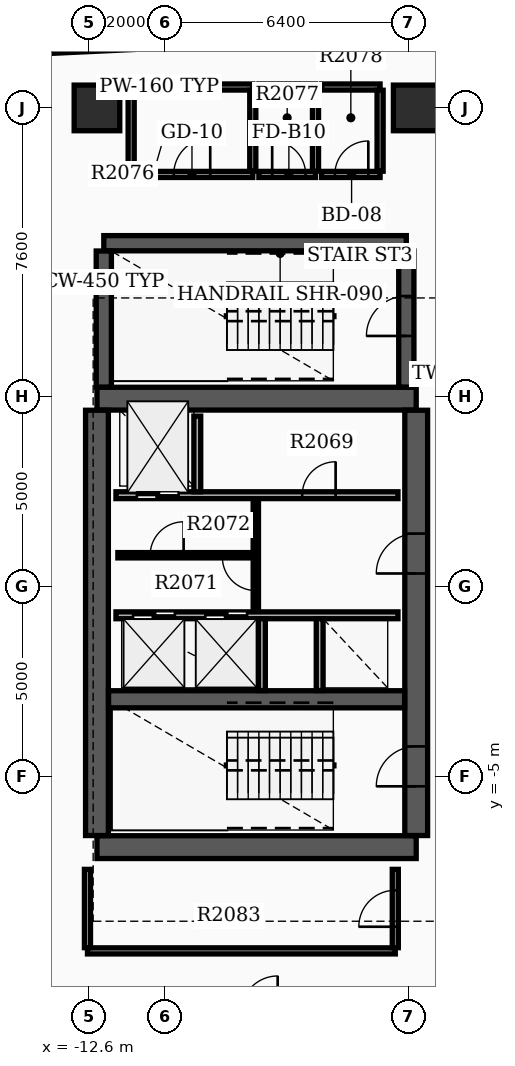
"""IFC4 building model, lengths in metres.
Left out: names, types, materials, properties, quantities, classifications, styles, units other than length and angle.
Written with IfcOpenShell. Run it as: python <this file> out.ifc"""

import sys

from ifc_helpers import new_model, si_unit, direction, frame, frame_2d, origin, origin_2d, place, context, subcontext, project, spatial, rectangle, extrude, element, fill, save


model = new_model("IFC4")
c1 = context("Model", 3, precision=1e-05, world=origin(), true_north=direction((0.0, 1.0)))
c2 = subcontext(c1, "Body", "Model", "MODEL_VIEW")
j1 = project(units=[si_unit("LENGTHUNIT", "METRE"), si_unit("PLANEANGLEUNIT", "RADIAN")], contexts=[c1])
p1 = place(None, origin())
s1 = spatial("IfcSite", under=j1, at=p1, CompositionType="ELEMENT")
p2 = place(p1, origin())
s2 = spatial("IfcBuilding", under=s1, at=p2, CompositionType="ELEMENT")
p3 = place(p2, frame((0.0, 0.0, 132.0)))
s3 = spatial("IfcBuildingStorey", under=s2, at=p3, CompositionType="ELEMENT", Elevation=132.0)
for number, where, z_axis, x_axis in (
    (1, (-12.4, -6.85, 0.0), (0.0, 0.0, 1.0), (1.0, 0.0, 0.0)),
    (2, (-12.4, 4.95, 0.0), (0.0, 0.0, 1.0), (1.0, 0.0, 0.0)),
):
    element("IfcWall", number, at=place(p3, frame(where, z_axis=z_axis, x_axis=x_axis)), inside=s3, PredefinedType="SHEAR", context=c2, shape_type="SweptSolid", body=[
        extrude(rectangle(XDim=8.4, YDim=0.6, at=frame_2d((4.2, 0.0))), origin(), (0.0, 0.0, 1.0), 3.7),
    ])
p4 = place(p3, frame((-12.4, -6.545, 0.0), z_axis=(0.0, 0.0, 1.0), x_axis=(0.0, 1.0, 0.0)))
e3 = element("IfcWall", 3, at=p4, inside=s3, PredefinedType="SHEAR", context=c2, shape_type="SweptSolid", body=[
    extrude(rectangle(XDim=11.19, YDim=0.6, at=frame_2d((5.595, 0.0))), origin(), (0.0, 0.0, 1.0), 3.7),
])
p5 = place(p3, frame((-4.0, -6.545, 0.0), z_axis=(0.0, 0.0, 1.0), x_axis=(0.0, 1.0, 0.0)))
e4 = element("IfcWall", 4, at=p5, inside=s3, PredefinedType="SHEAR", context=c2, shape_type="SweptSolid", body=[
    extrude(rectangle(XDim=11.19, YDim=0.6, at=frame_2d((5.595, 0.0))), origin(), (0.0, 0.0, 1.0), 3.7),
])
p6 = place(p5, frame((1.295, 0.0, 0.0)))
e5 = element("IfcOpeningElement", 5, at=p6, cuts=e4, PredefinedType="OPENING", context=c2, shape_type="SweptSolid", body=[
    extrude(rectangle(XDim=1.05, YDim=2.15, at=frame_2d((0.525, 1.075))), frame((0.0, 0.31, 0.0), z_axis=(0.0, -1.0, 0.0), x_axis=(1.0, 0.0, 0.0)), (0.0, 0.0, 1.0), 0.62),
])
p7 = place(p5, frame((6.895, 0.0, 0.0)))
e6 = element("IfcOpeningElement", 6, at=p7, cuts=e4, PredefinedType="OPENING", context=c2, shape_type="SweptSolid", body=[
    extrude(rectangle(XDim=1.05, YDim=2.15, at=frame_2d((0.525, 1.075))), frame((0.0, 0.31, 0.0), z_axis=(0.0, -1.0, 0.0), x_axis=(1.0, 0.0, 0.0)), (0.0, 0.0, 1.0), 0.62),
])
p8 = place(p3, frame((-12.095, -2.96, 0.0), z_axis=(0.0, 0.0, 1.0), x_axis=(1.0, 0.0, 0.0)))
e7 = element("IfcWall", 7, at=p8, inside=s3, PredefinedType="SHEAR", context=c2, shape_type="SweptSolid", body=[
    extrude(rectangle(XDim=7.79, YDim=0.45, at=frame_2d((3.895, 0.0))), origin(), (0.0, 0.0, 1.0), 3.7),
])
p9 = place(p3, frame((-12.22, 9.04, 0.0), z_axis=(0.0, 0.0, 1.0), x_axis=(1.0, 0.0, 0.0)))
e8 = element("IfcWall", 8, at=p9, inside=s3, PredefinedType="SHEAR", context=c2, shape_type="SweptSolid", body=[
    extrude(rectangle(XDim=7.96, YDim=0.4, at=frame_2d((3.98, 0.0))), origin(), (0.0, 0.0, 1.0), 3.7),
])
p10 = place(p3, frame((-12.22, 5.255, 0.0), z_axis=(0.0, 0.0, 1.0), x_axis=(0.0, 1.0, 0.0)))
e9 = element("IfcWall", 9, at=p10, inside=s3, PredefinedType="SHEAR", context=c2, shape_type="SweptSolid", body=[
    extrude(rectangle(XDim=3.58, YDim=0.4, at=frame_2d((1.79, 0.0))), origin(), (0.0, 0.0, 1.0), 3.7),
])
p11 = place(p3, frame((-4.26, 5.255, 0.0), z_axis=(0.0, 0.0, 1.0), x_axis=(0.0, 1.0, 0.0)))
e10 = element("IfcWall", 10, at=p11, inside=s3, PredefinedType="SHEAR", context=c2, shape_type="SweptSolid", body=[
    extrude(rectangle(XDim=3.58, YDim=0.4, at=frame_2d((1.79, 0.0))), origin(), (0.0, 0.0, 1.0), 3.7),
])
p12 = place(p11, frame((1.345, 0.0, 0.0)))
e11 = element("IfcOpeningElement", 11, at=p12, cuts=e10, PredefinedType="OPENING", context=c2, shape_type="SweptSolid", body=[
    extrude(rectangle(XDim=1.05, YDim=2.15, at=frame_2d((0.525, 1.075))), frame((0.0, 0.21, 0.0), z_axis=(0.0, -1.0, 0.0), x_axis=(1.0, 0.0, 0.0)), (0.0, 0.0, 1.0), 0.42),
])
for number, where, z_axis, x_axis in (
    (12, (-12.4, 12.6, 0.0), (0.0, 0.0, 1.0), (1.0, 0.0, 0.0)),
    (13, (-4.0, 12.6, 0.0), (0.0, 0.0, 1.0), (1.0, 0.0, 0.0)),
):
    element("IfcColumn", number, at=place(p3, frame(where, z_axis=z_axis, x_axis=x_axis)), inside=s3, PredefinedType="COLUMN", context=c2, shape_type="SweptSolid", body=[
        extrude(rectangle(XDim=1.2, YDim=1.2, at=origin_2d()), origin(), (0.0, 0.0, 1.0), 3.9),
    ])
p13 = place(p3, frame((-13.843, 14.164, 0.0), z_axis=(0.0, 0.0, 1.0), x_axis=(0.998889082162, 0.047123258997, 0.0)))
e14 = element("IfcWall", 14, at=p13, inside=s3, PredefinedType="STANDARD", context=c2, shape_type="SweptSolid", body=[
    extrude(rectangle(XDim=6.3, YDim=0.28, at=frame_2d((3.15, 0.0))), origin(), (0.0, 0.0, 1.0), 2.97),
])
p14 = place(p3, frame((-11.9, 2.41, 0.0), z_axis=(0.0, 0.0, 1.0), x_axis=(1.0, 0.0, 0.0)))
e15 = element("IfcWall", 15, at=p14, inside=s3, PredefinedType="SOLIDWALL", context=c2, shape_type="SweptSolid", body=[
    extrude(rectangle(XDim=7.42, YDim=0.18, at=frame_2d((3.71, 0.0))), origin(), (0.0, 0.0, 1.0), 2.96),
])
p15 = place(p14, frame((0.55, 0.0, 0.0)))
e16 = element("IfcOpeningElement", 16, at=p15, cuts=e15, PredefinedType="OPENING", context=c2, shape_type="SweptSolid", body=[
    extrude(rectangle(XDim=1.1, YDim=2.15, at=frame_2d((0.55, 1.075))), frame((0.0, 0.1, 0.0), z_axis=(0.0, -1.0, 0.0), x_axis=(1.0, 0.0, 0.0)), (0.0, 0.0, 1.0), 0.2),
])
p16 = place(p14, frame((4.9, 0.0, 0.0)))
e17 = element("IfcOpeningElement", 17, at=p16, cuts=e15, PredefinedType="OPENING", context=c2, shape_type="SweptSolid", body=[
    extrude(rectangle(XDim=0.88, YDim=2.1, at=frame_2d((0.44, 1.05))), frame((0.0, 0.1, 0.0), z_axis=(0.0, -1.0, 0.0), x_axis=(1.0, 0.0, 0.0)), (0.0, 0.0, 1.0), 0.2),
])
p17 = place(p3, frame((-11.9, -0.75, 0.0), z_axis=(0.0, 0.0, 1.0), x_axis=(1.0, 0.0, 0.0)))
e18 = element("IfcWall", 18, at=p17, inside=s3, PredefinedType="SOLIDWALL", context=c2, shape_type="SweptSolid", body=[
    extrude(rectangle(XDim=7.42, YDim=0.18, at=frame_2d((3.71, 0.0))), origin(), (0.0, 0.0, 1.0), 2.96),
])
p18 = place(p17, frame((0.45, 0.0, 0.0)))
e19 = element("IfcOpeningElement", 19, at=p18, cuts=e18, PredefinedType="OPENING", context=c2, shape_type="SweptSolid", body=[
    extrude(rectangle(XDim=1.1, YDim=2.15, at=frame_2d((0.55, 1.075))), frame((0.0, 0.1, 0.0), z_axis=(0.0, -1.0, 0.0), x_axis=(1.0, 0.0, 0.0)), (0.0, 0.0, 1.0), 0.2),
])
p19 = place(p17, frame((2.35, 0.0, 0.0)))
e20 = element("IfcOpeningElement", 20, at=p19, cuts=e18, PredefinedType="OPENING", context=c2, shape_type="SweptSolid", body=[
    extrude(rectangle(XDim=1.1, YDim=2.15, at=frame_2d((0.55, 1.075))), frame((0.0, 0.1, 0.0), z_axis=(0.0, -1.0, 0.0), x_axis=(1.0, 0.0, 0.0)), (0.0, 0.0, 1.0), 0.2),
])
p20 = place(p3, frame((-9.76, 2.5, 0.0), z_axis=(0.0, 0.0, 1.0), x_axis=(0.0, 1.0, 0.0)))
e21 = element("IfcWall", 21, at=p20, inside=s3, PredefinedType="SOLIDWALL", context=c2, shape_type="SweptSolid", body=[
    extrude(rectangle(XDim=1.99, YDim=0.18, at=frame_2d((0.995, 0.0))), origin(), (0.0, 0.0, 1.0), 2.96),
])
for number, where, z_axis, x_axis in (
    (22, (-8.06, -2.73, 0.0), (0.0, 0.0, 1.0), (0.0, 1.0, 0.0)),
    (23, (-6.54, -2.73, 0.0), (0.0, 0.0, 1.0), (0.0, 1.0, 0.0)),
):
    element("IfcWall", number, at=place(p3, frame(where, z_axis=z_axis, x_axis=x_axis)), inside=s3, PredefinedType="SOLIDWALL", context=c2, shape_type="SweptSolid", body=[
        extrude(rectangle(XDim=1.89, YDim=0.18, at=frame_2d((0.945, 0.0))), origin(), (0.0, 0.0, 1.0), 2.96),
    ])
p21 = place(p3, frame((-8.22, -0.65, 0.0), z_axis=(0.0, 0.0, 1.0), x_axis=(0.0, 1.0, 0.0)))
e24 = element("IfcWall", 24, at=p21, inside=s3, PredefinedType="SOLIDWALL", context=c2, shape_type="SweptSolid", body=[
    extrude(rectangle(XDim=2.96, YDim=0.14, at=frame_2d((1.48, 0.0))), origin(), (0.0, 0.0, 1.0), 2.96),
])
p22 = place(p21, frame((0.55, 0.0, 0.0)))
e25 = element("IfcOpeningElement", 25, at=p22, cuts=e24, PredefinedType="OPENING", context=c2, shape_type="SweptSolid", body=[
    extrude(rectangle(XDim=0.88, YDim=2.1, at=frame_2d((0.44, 1.05))), frame((0.0, 0.08, 0.0), z_axis=(0.0, -1.0, 0.0), x_axis=(1.0, 0.0, 0.0)), (0.0, 0.0, 1.0), 0.16),
])
p23 = place(p3, frame((-11.85, 0.83, 0.0), z_axis=(0.0, 0.0, 1.0), x_axis=(1.0, 0.0, 0.0)))
e26 = element("IfcWall", 26, at=p23, inside=s3, PredefinedType="PARTITIONING", context=c2, shape_type="SweptSolid", body=[
    extrude(rectangle(XDim=3.552, YDim=0.14, at=frame_2d((1.776, 0.0))), origin(), (0.0, 0.0, 1.0), 2.96),
])
p24 = place(p23, frame((0.85, 0.0, 0.0)))
e27 = element("IfcOpeningElement", 27, at=p24, cuts=e26, PredefinedType="OPENING", context=c2, shape_type="SweptSolid", body=[
    extrude(rectangle(XDim=0.88, YDim=2.1, at=frame_2d((0.44, 1.05))), frame((0.0, 0.08, 0.0), z_axis=(0.0, -1.0, 0.0), x_axis=(1.0, 0.0, 0.0)), (0.0, 0.0, 1.0), 0.16),
])
p25 = place(p3, frame((-11.5, 10.85, 0.0), z_axis=(0.0, 0.0, 1.0), x_axis=(1.0, 0.0, 0.0)))
e28 = element("IfcWall", 28, at=p25, inside=s3, PredefinedType="PARTITIONING", context=c2, shape_type="SweptSolid", body=[
    extrude(rectangle(XDim=3.2, YDim=0.16, at=frame_2d((1.6, 0.0))), origin(), (0.0, 0.0, 1.0), 2.96),
])
p26 = place(p25, frame((1.12, 0.0, 0.0)))
e29 = element("IfcOpeningElement", 29, at=p26, cuts=e28, PredefinedType="OPENING", context=c2, shape_type="SweptSolid", body=[
    extrude(rectangle(XDim=0.96, YDim=2.15, at=frame_2d((0.48, 1.075))), frame((0.0, 0.09, 0.0), z_axis=(0.0, -1.0, 0.0), x_axis=(1.0, 0.0, 0.0)), (0.0, 0.0, 1.0), 0.18),
])
p27 = place(p3, frame((-11.5, 13.15, 0.0), z_axis=(0.0, 0.0, 1.0), x_axis=(1.0, 0.0, 0.0)))
e30 = element("IfcWall", 30, at=p27, inside=s3, PredefinedType="PARTITIONING", context=c2, shape_type="SweptSolid", body=[
    extrude(rectangle(XDim=3.2, YDim=0.16, at=frame_2d((1.6, 0.0))), origin(), (0.0, 0.0, 1.0), 2.96),
])
for number, where, z_axis, x_axis in (
    (31, (-11.5, 10.935, 0.0), (0.0, 0.0, 1.0), (0.0, 1.0, 0.0)),
    (32, (-8.3, 10.935, 0.0), (0.0, 0.0, 1.0), (0.0, 1.0, 0.0)),
):
    element("IfcWall", number, at=place(p3, frame(where, z_axis=z_axis, x_axis=x_axis)), inside=s3, PredefinedType="PARTITIONING", context=c2, shape_type="SweptSolid", body=[
        extrude(rectangle(XDim=2.13, YDim=0.16, at=frame_2d((1.065, 0.0))), origin(), (0.0, 0.0, 1.0), 2.96),
    ])
p28 = place(p3, frame((-8.14, 10.85, 0.0), z_axis=(0.0, 0.0, 1.0), x_axis=(1.0, 0.0, 0.0)))
e33 = element("IfcWall", 33, at=p28, inside=s3, PredefinedType="PARTITIONING", context=c2, shape_type="SweptSolid", body=[
    extrude(rectangle(XDim=1.49, YDim=0.16, at=frame_2d((0.745, 0.0))), origin(), (0.0, 0.0, 1.0), 2.96),
])
p29 = place(p28, frame((0.35, 0.0, 0.0)))
e34 = element("IfcOpeningElement", 34, at=p29, cuts=e33, PredefinedType="OPENING", context=c2, shape_type="SweptSolid", body=[
    extrude(rectangle(XDim=0.88, YDim=2.1, at=frame_2d((0.44, 1.05))), frame((0.0, 0.09, 0.0), z_axis=(0.0, -1.0, 0.0), x_axis=(1.0, 0.0, 0.0)), (0.0, 0.0, 1.0), 0.18),
])
p30 = place(p3, frame((-8.14, 13.15, 0.0), z_axis=(0.0, 0.0, 1.0), x_axis=(1.0, 0.0, 0.0)))
e35 = element("IfcWall", 35, at=p30, inside=s3, PredefinedType="PARTITIONING", context=c2, shape_type="SweptSolid", body=[
    extrude(rectangle(XDim=1.49, YDim=0.16, at=frame_2d((0.745, 0.0))), origin(), (0.0, 0.0, 1.0), 2.96),
])
p31 = place(p3, frame((-6.65, 10.935, 0.0), z_axis=(0.0, 0.0, 1.0), x_axis=(0.0, 1.0, 0.0)))
e36 = element("IfcWall", 36, at=p31, inside=s3, PredefinedType="PARTITIONING", context=c2, shape_type="SweptSolid", body=[
    extrude(rectangle(XDim=2.13, YDim=0.16, at=frame_2d((1.065, 0.0))), origin(), (0.0, 0.0, 1.0), 2.96),
])
p32 = place(p3, frame((-6.49, 10.85, 0.0), z_axis=(0.0, 0.0, 1.0), x_axis=(1.0, 0.0, 0.0)))
e37 = element("IfcWall", 37, at=p32, inside=s3, PredefinedType="PARTITIONING", context=c2, shape_type="SweptSolid", body=[
    extrude(rectangle(XDim=1.54, YDim=0.16, at=frame_2d((0.77, 0.0))), origin(), (0.0, 0.0, 1.0), 2.96),
])
p33 = place(p32, frame((0.35, 0.0, 0.0)))
e38 = element("IfcOpeningElement", 38, at=p33, cuts=e37, PredefinedType="OPENING", context=c2, shape_type="SweptSolid", body=[
    extrude(rectangle(XDim=0.88, YDim=2.15, at=frame_2d((0.44, 1.075))), frame((0.0, 0.09, 0.0), z_axis=(0.0, -1.0, 0.0), x_axis=(1.0, 0.0, 0.0)), (0.0, 0.0, 1.0), 0.18),
])
p34 = place(p3, frame((-6.49, 13.15, 0.0), z_axis=(0.0, 0.0, 1.0), x_axis=(1.0, 0.0, 0.0)))
e39 = element("IfcWall", 39, at=p34, inside=s3, PredefinedType="PARTITIONING", context=c2, shape_type="SweptSolid", body=[
    extrude(rectangle(XDim=1.54, YDim=0.16, at=frame_2d((0.77, 0.0))), origin(), (0.0, 0.0, 1.0), 2.96),
])
p35 = place(p3, frame((-4.95, 10.935, 0.0), z_axis=(0.0, 0.0, 1.0), x_axis=(0.0, 1.0, 0.0)))
e40 = element("IfcWall", 40, at=p35, inside=s3, PredefinedType="PARTITIONING", context=c2, shape_type="SweptSolid", body=[
    extrude(rectangle(XDim=2.13, YDim=0.16, at=frame_2d((1.065, 0.0))), origin(), (0.0, 0.0, 1.0), 2.96),
])
p36 = place(p3, frame((-12.65, -9.58, 0.0), z_axis=(0.0, 0.0, 1.0), x_axis=(1.0, 0.0, 0.0)))
e41 = element("IfcWall", 41, at=p36, inside=s3, PredefinedType="PARTITIONING", context=c2, shape_type="SweptSolid", body=[
    extrude(rectangle(XDim=8.1, YDim=0.16, at=frame_2d((4.05, 0.0))), origin(), (0.0, 0.0, 1.0), 2.96),
])
p37 = place(p3, frame((-12.65, -9.495, 0.0), z_axis=(0.0, 0.0, 1.0), x_axis=(0.0, 1.0, 0.0)))
e42 = element("IfcWall", 42, at=p37, inside=s3, PredefinedType="PARTITIONING", context=c2, shape_type="SweptSolid", body=[
    extrude(rectangle(XDim=2.06, YDim=0.16, at=frame_2d((1.03, 0.0))), origin(), (0.0, 0.0, 1.0), 2.96),
])
p38 = place(p3, frame((-4.55, -9.495, 0.0), z_axis=(0.0, 0.0, 1.0), x_axis=(0.0, 1.0, 0.0)))
e43 = element("IfcWall", 43, at=p38, inside=s3, PredefinedType="PARTITIONING", context=c2, shape_type="SweptSolid", body=[
    extrude(rectangle(XDim=2.06, YDim=0.16, at=frame_2d((1.03, 0.0))), origin(), (0.0, 0.0, 1.0), 2.96),
])
p39 = place(p38, frame((0.55, 0.0, 0.0)))
e44 = element("IfcOpeningElement", 44, at=p39, cuts=e43, PredefinedType="OPENING", context=c2, shape_type="SweptSolid", body=[
    extrude(rectangle(XDim=0.96, YDim=2.15, at=frame_2d((0.48, 1.075))), frame((0.0, 0.09, 0.0), z_axis=(0.0, -1.0, 0.0), x_axis=(1.0, 0.0, 0.0)), (0.0, 0.0, 1.0), 0.18),
])
p40 = place(p6, origin())
e45 = element("IfcDoor", 45, at=p40, inside=s3, OperationType="SINGLE_SWING_LEFT", PredefinedType="DOOR", context=c2, shape_type="SweptSolid", body=[
    extrude(rectangle(XDim=1.05, YDim=2.15, at=frame_2d((0.525, 1.075))), frame((0.0, 0.025, 0.0), z_axis=(0.0, -1.0, 0.0), x_axis=(1.0, 0.0, 0.0)), (0.0, 0.0, 1.0), 0.05),
])
fill(e5, e45)
p41 = place(p7, origin())
e46 = element("IfcDoor", 46, at=p41, inside=s3, OperationType="SINGLE_SWING_LEFT", PredefinedType="DOOR", context=c2, shape_type="SweptSolid", body=[
    extrude(rectangle(XDim=1.05, YDim=2.15, at=frame_2d((0.525, 1.075))), frame((0.0, 0.025, 0.0), z_axis=(0.0, -1.0, 0.0), x_axis=(1.0, 0.0, 0.0)), (0.0, 0.0, 1.0), 0.05),
])
fill(e6, e46)
p42 = place(p12, origin())
e47 = element("IfcDoor", 47, at=p42, inside=s3, OperationType="SINGLE_SWING_LEFT", PredefinedType="DOOR", context=c2, shape_type="SweptSolid", body=[
    extrude(rectangle(XDim=1.05, YDim=2.15, at=frame_2d((0.525, 1.075))), frame((0.0, 0.025, 0.0), z_axis=(0.0, -1.0, 0.0), x_axis=(1.0, 0.0, 0.0)), (0.0, 0.0, 1.0), 0.05),
])
fill(e11, e47)
p43 = place(p15, origin())
e48 = element("IfcDoor", 48, at=p43, inside=s3, OperationType="DOUBLE_DOOR_SLIDING", PredefinedType="DOOR", context=c2, shape_type="SweptSolid", body=[
    extrude(rectangle(XDim=1.1, YDim=2.15, at=frame_2d((0.55, 1.075))), frame((0.0, 0.025, 0.0), z_axis=(0.0, -1.0, 0.0), x_axis=(1.0, 0.0, 0.0)), (0.0, 0.0, 1.0), 0.05),
])
fill(e16, e48)
p44 = place(p18, origin())
e49 = element("IfcDoor", 49, at=p44, inside=s3, OperationType="DOUBLE_DOOR_SLIDING", PredefinedType="DOOR", context=c2, shape_type="SweptSolid", body=[
    extrude(rectangle(XDim=1.1, YDim=2.15, at=frame_2d((0.55, 1.075))), frame((0.0, 0.025, 0.0), z_axis=(0.0, -1.0, 0.0), x_axis=(1.0, 0.0, 0.0)), (0.0, 0.0, 1.0), 0.05),
])
fill(e19, e49)
p45 = place(p19, origin())
e50 = element("IfcDoor", 50, at=p45, inside=s3, OperationType="DOUBLE_DOOR_SLIDING", PredefinedType="DOOR", context=c2, shape_type="SweptSolid", body=[
    extrude(rectangle(XDim=1.1, YDim=2.15, at=frame_2d((0.55, 1.075))), frame((0.0, 0.025, 0.0), z_axis=(0.0, -1.0, 0.0), x_axis=(1.0, 0.0, 0.0)), (0.0, 0.0, 1.0), 0.05),
])
fill(e20, e50)
p46 = place(p16, origin())
e51 = element("IfcDoor", 51, at=p46, inside=s3, OperationType="SINGLE_SWING_RIGHT", PredefinedType="DOOR", context=c2, shape_type="SweptSolid", body=[
    extrude(rectangle(XDim=0.88, YDim=2.1, at=frame_2d((0.44, 1.05))), frame((0.0, 0.025, 0.0), z_axis=(0.0, -1.0, 0.0), x_axis=(1.0, 0.0, 0.0)), (0.0, 0.0, 1.0), 0.05),
])
fill(e17, e51)
p47 = place(p22, origin())
e52 = element("IfcDoor", 52, at=p47, inside=s3, OperationType="SINGLE_SWING_RIGHT", PredefinedType="DOOR", context=c2, shape_type="SweptSolid", body=[
    extrude(rectangle(XDim=0.88, YDim=2.1, at=frame_2d((0.44, 1.05))), frame((0.0, 0.025, 0.0), z_axis=(0.0, -1.0, 0.0), x_axis=(1.0, 0.0, 0.0)), (0.0, 0.0, 1.0), 0.05),
])
fill(e25, e52)
p48 = place(p24, origin())
e53 = element("IfcDoor", 53, at=p48, inside=s3, OperationType="SINGLE_SWING_RIGHT", PredefinedType="DOOR", context=c2, shape_type="SweptSolid", body=[
    extrude(rectangle(XDim=0.88, YDim=2.1, at=frame_2d((0.44, 1.05))), frame((0.0, 0.025, 0.0), z_axis=(0.0, -1.0, 0.0), x_axis=(1.0, 0.0, 0.0)), (0.0, 0.0, 1.0), 0.05),
])
fill(e27, e53)
p49 = place(p26, origin())
e54 = element("IfcDoor", 54, at=p49, inside=s3, OperationType="SINGLE_SWING_RIGHT", PredefinedType="DOOR", context=c2, shape_type="SweptSolid", body=[
    extrude(rectangle(XDim=0.96, YDim=2.15, at=frame_2d((0.48, 1.075))), frame((0.0, 0.025, 0.0), z_axis=(0.0, -1.0, 0.0), x_axis=(1.0, 0.0, 0.0)), (0.0, 0.0, 1.0), 0.05),
])
fill(e29, e54)
p50 = place(p29, origin())
e55 = element("IfcDoor", 55, at=p50, inside=s3, OperationType="SINGLE_SWING_LEFT", PredefinedType="DOOR", context=c2, shape_type="SweptSolid", body=[
    extrude(rectangle(XDim=0.88, YDim=2.1, at=frame_2d((0.44, 1.05))), frame((0.0, 0.025, 0.0), z_axis=(0.0, -1.0, 0.0), x_axis=(1.0, 0.0, 0.0)), (0.0, 0.0, 1.0), 0.05),
])
fill(e34, e55)
p51 = place(p33, origin())
e56 = element("IfcDoor", 56, at=p51, inside=s3, OperationType="SINGLE_SWING_RIGHT", PredefinedType="DOOR", context=c2, shape_type="SweptSolid", body=[
    extrude(rectangle(XDim=0.88, YDim=2.15, at=frame_2d((0.44, 1.075))), frame((0.0, 0.025, 0.0), z_axis=(0.0, -1.0, 0.0), x_axis=(1.0, 0.0, 0.0)), (0.0, 0.0, 1.0), 0.05),
])
fill(e38, e56)
p52 = place(p39, origin())
e57 = element("IfcDoor", 57, at=p52, inside=s3, OperationType="SINGLE_SWING_LEFT", PredefinedType="DOOR", context=c2, shape_type="SweptSolid", body=[
    extrude(rectangle(XDim=0.96, YDim=2.15, at=frame_2d((0.48, 1.075))), frame((0.0, 0.025, 0.0), z_axis=(0.0, -1.0, 0.0), x_axis=(1.0, 0.0, 0.0)), (0.0, 0.0, 1.0), 0.05),
])
fill(e44, e57)
save(model, sys.argv[1])
